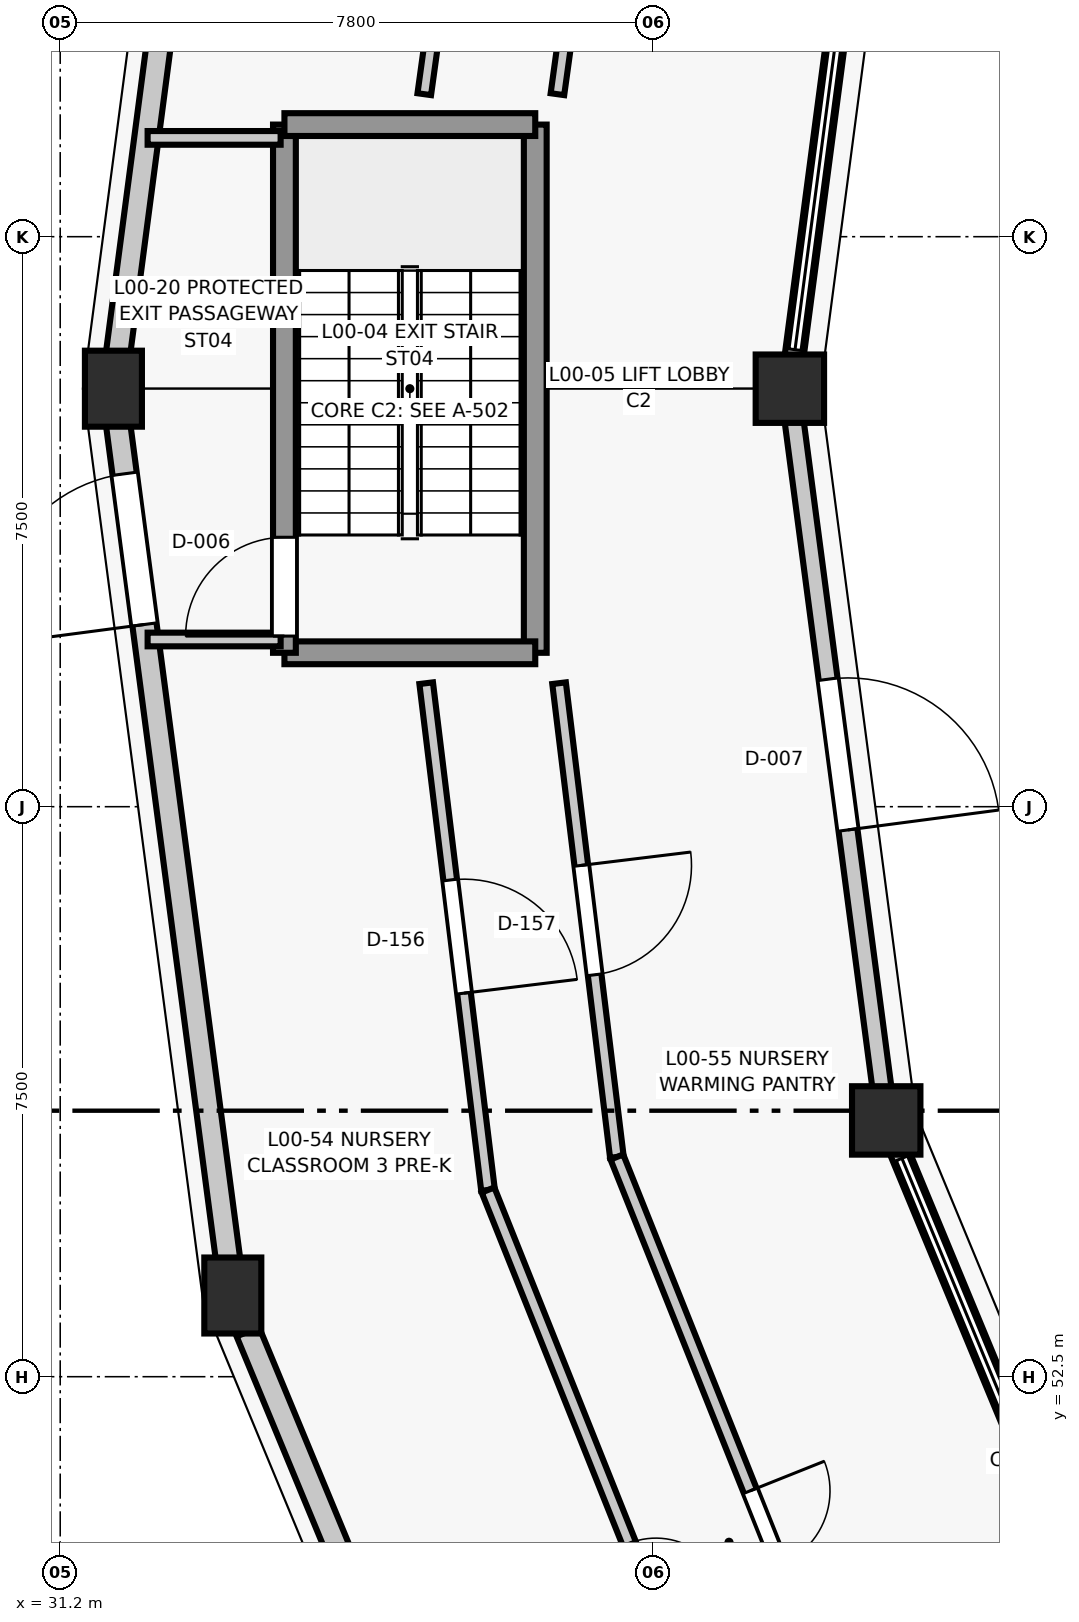
"""IFC4 building model, lengths in metres.
Left out: names, types, materials, properties, quantities, classifications, styles, units other than length and angle.
Written with IfcOpenShell. Run it as: python <this file> out.ifc"""

import sys

from ifc_helpers import new_model, si_unit, direction, frame, frame_2d, origin, origin_2d, place, context, subcontext, project, spatial, rectangle, circle, extrude, element, fill, save


model = new_model("IFC4")
c1 = context("Model", 3, precision=1e-05, world=origin(), true_north=direction((0.0, 1.0)))
c2 = subcontext(c1, "Body", "Model", "MODEL_VIEW")
j1 = project(units=[si_unit("LENGTHUNIT", "METRE"), si_unit("PLANEANGLEUNIT", "RADIAN")], contexts=[c1])
p1 = place(None, origin())
s1 = spatial("IfcSite", under=j1, at=p1, CompositionType="ELEMENT")
p2 = place(p1, origin())
s2 = spatial("IfcBuilding", under=s1, at=p2, CompositionType="ELEMENT")
p3 = place(p2, origin())
s3 = spatial("IfcBuildingStorey", under=s2, at=p3, CompositionType="ELEMENT", Elevation=0.0)
for number, where, z_axis, x_axis in (
    (1, (40.8, 65.5, 0.0), (0.0, 0.0, 1.0), (1.0, 0.0, 0.0)),
    (2, (42.068, 55.872, 0.0), (0.0, 0.0, 1.0), (1.0, 0.0, 0.0)),
):
    element("IfcColumn", number, at=place(p3, frame(where, z_axis=z_axis, x_axis=x_axis)), inside=s3, PredefinedType="COLUMN", context=c2, shape_type="SweptSolid", body=[
        extrude(circle(Radius=0.45, at=origin_2d()), origin(), (0.0, 0.0, 1.0), 4.5),
    ])
for number, where, z_axis, x_axis in (
    (3, (31.9, 65.5, 0.0), (0.0, 0.0, 1.0), (1.0, 0.0, 0.0)),
    (4, (33.471, 53.568, 0.0), (0.0, 0.0, 1.0), (1.0, 0.0, 0.0)),
):
    element("IfcColumn", number, at=place(p3, frame(where, z_axis=z_axis, x_axis=x_axis)), inside=s3, PredefinedType="COLUMN", context=c2, shape_type="SweptSolid", body=[
        extrude(rectangle(XDim=0.75, YDim=1.0, at=origin_2d()), origin(), (0.0, 0.0, 1.0), 4.5),
    ])
p4 = place(p3, frame((31.963, 65.975, 0.0), z_axis=(0.0, 0.0, 1.0), x_axis=(0.130513242145, 0.991446566197, 0.0)))
e5 = element("IfcWall", 5, at=p4, inside=s3, PredefinedType="STANDARD", context=c2, shape_type="SweptSolid", body=[
    extrude(rectangle(XDim=11.076, YDim=0.32, at=frame_2d((5.538, 0.0))), origin(), (0.0, 0.0, 1.0), 3.466),
])
p5 = place(p4, frame((4.913, 0.0, 0.0)))
e6 = element("IfcOpeningElement", 6, at=p5, cuts=e5, PredefinedType="OPENING", context=c2, shape_type="SweptSolid", body=[
    extrude(rectangle(XDim=1.25, YDim=2.2, at=frame_2d((0.625, 1.1))), frame((0.0, 0.17, 0.0), z_axis=(0.0, -1.0, 0.0), x_axis=(1.0, 0.0, 0.0)), (0.0, 0.0, 1.0), 0.34),
])
p6 = place(p3, frame((42.031, 74.853, 0.0), z_axis=(0.0, 0.0, 1.0), x_axis=(-0.130549698469, -0.991441766434, 0.0)))
e7 = element("IfcWall", 7, at=p6, inside=s3, PredefinedType="STANDARD", context=c2, shape_type="SweptSolid", body=[
    extrude(rectangle(XDim=9.156, YDim=0.25, at=frame_2d((4.578, 0.0))), origin(), (0.0, 0.0, 1.0), 0.82),
])
p7 = place(p3, frame((33.408, 54.044, 0.0), z_axis=(0.0, 0.0, 1.0), x_axis=(-0.130513242145, 0.991446566197, 0.0)))
e8 = element("IfcWall", 8, at=p7, inside=s3, PredefinedType="STANDARD", context=c2, shape_type="SweptSolid", body=[
    extrude(rectangle(XDim=11.076, YDim=0.32, at=frame_2d((5.538, 0.0))), origin(), (0.0, 0.0, 1.0), 3.466),
])
p8 = place(p7, frame((8.426, 0.0, 0.0)))
e9 = element("IfcOpeningElement", 9, at=p8, cuts=e8, PredefinedType="OPENING", context=c2, shape_type="SweptSolid", body=[
    extrude(rectangle(XDim=2.0, YDim=2.3, at=frame_2d((1.0, 1.15))), frame((0.0, 0.17, 0.0), z_axis=(0.0, -1.0, 0.0), x_axis=(1.0, 0.0, 0.0)), (0.0, 0.0, 1.0), 0.34),
])
p9 = place(p3, frame((40.836, 65.225, 0.0), z_axis=(0.0, 0.0, 1.0), x_axis=(0.130549698469, -0.991441766434, 0.0)))
e10 = element("IfcWall", 10, at=p9, inside=s3, PredefinedType="STANDARD", context=c2, shape_type="SweptSolid", body=[
    extrude(rectangle(XDim=9.156, YDim=0.25, at=frame_2d((4.578, 0.0))), origin(), (0.0, 0.0, 1.0), 3.549),
])
p10 = place(p9, frame((3.578, 0.0, 0.0)))
e11 = element("IfcOpeningElement", 11, at=p10, cuts=e10, PredefinedType="OPENING", context=c2, shape_type="SweptSolid", body=[
    extrude(rectangle(XDim=2.0, YDim=2.3, at=frame_2d((1.0, 1.15))), frame((0.0, 0.135, 0.0), z_axis=(0.0, -1.0, 0.0), x_axis=(1.0, 0.0, 0.0)), (0.0, 0.0, 1.0), 0.27),
])
p11 = place(p3, frame((37.879, 42.927, 0.0), z_axis=(0.0, 0.0, 1.0), x_axis=(-0.382695413149, 0.923874569817, 0.0)))
e12 = element("IfcWall", 12, at=p11, inside=s3, PredefinedType="STANDARD", context=c2, shape_type="SweptSolid", body=[
    extrude(rectangle(XDim=11.002, YDim=0.32, at=frame_2d((5.501, 0.0))), origin(), (0.0, 0.0, 1.0), 3.466),
])
p12 = place(p11, frame((4.401, 0.0, 0.0)))
e13 = element("IfcOpeningElement", 13, at=p12, cuts=e12, PredefinedType="OPENING", context=c2, shape_type="SweptSolid", body=[
    extrude(rectangle(XDim=2.2, YDim=2.35, at=frame_2d((1.1, 1.175))), frame((0.0, 0.17, 0.0), z_axis=(0.0, -1.0, 0.0), x_axis=(1.0, 0.0, 0.0)), (0.0, 0.0, 1.0), 0.34),
])
p13 = place(p3, frame((42.182, 55.595, 0.0), z_axis=(0.0, 0.0, 1.0), x_axis=(0.382681519675, -0.923880324771, 0.0)))
e14 = element("IfcWall", 14, at=p13, inside=s3, PredefinedType="STANDARD", context=c2, shape_type="SweptSolid", body=[
    extrude(rectangle(XDim=9.112, YDim=0.25, at=frame_2d((4.556, 0.0))), origin(), (0.0, 0.0, 1.0), 0.82),
])
p14 = place(p3, frame((37.45, 68.975, 0.0), z_axis=(0.0, 0.0, 1.0), x_axis=(0.0, -1.0, 0.0)))
e15 = element("IfcWall", 15, at=p14, inside=s3, PredefinedType="SHEAR", context=c2, shape_type="SweptSolid", body=[
    extrude(rectangle(XDim=6.95, YDim=0.3, at=frame_2d((3.475, 0.0))), origin(), (0.0, 0.0, 1.0), 4.5),
])
p15 = place(p3, frame((37.45, 62.025, 0.0), z_axis=(0.0, 0.0, 1.0), x_axis=(-1.0, 0.0, 0.0)))
e16 = element("IfcWall", 16, at=p15, inside=s3, PredefinedType="SHEAR", context=c2, shape_type="SweptSolid", body=[
    extrude(rectangle(XDim=3.3, YDim=0.3, at=frame_2d((1.65, 0.0))), origin(), (0.0, 0.0, 1.0), 4.5),
])
p16 = place(p3, frame((34.15, 62.025, 0.0), z_axis=(0.0, 0.0, 1.0), x_axis=(0.0, 1.0, 0.0)))
e17 = element("IfcWall", 17, at=p16, inside=s3, PredefinedType="SHEAR", context=c2, shape_type="SweptSolid", body=[
    extrude(rectangle(XDim=6.95, YDim=0.3, at=frame_2d((3.475, 0.0))), origin(), (0.0, 0.0, 1.0), 4.5),
])
p17 = place(p16, frame((0.22, 0.0, 0.0)))
e18 = element("IfcOpeningElement", 18, at=p17, cuts=e17, PredefinedType="OPENING", context=c2, shape_type="SweptSolid", body=[
    extrude(rectangle(XDim=1.3, YDim=2.15, at=frame_2d((0.65, 1.075))), frame((0.0, 0.16, 0.0), z_axis=(0.0, -1.0, 0.0), x_axis=(1.0, 0.0, 0.0)), (0.0, 0.0, 1.0), 0.32),
])
p18 = place(p3, frame((34.15, 68.975, 0.0), z_axis=(0.0, 0.0, 1.0), x_axis=(1.0, 0.0, 0.0)))
e19 = element("IfcWall", 19, at=p18, inside=s3, PredefinedType="SHEAR", context=c2, shape_type="SweptSolid", body=[
    extrude(rectangle(XDim=3.3, YDim=0.3, at=frame_2d((1.65, 0.0))), origin(), (0.0, 0.0, 1.0), 4.5),
])
for number, where, z_axis, x_axis in (
    (20, (32.35, 62.2, 0.0), (0.0, 0.0, 1.0), (1.0, 0.0, 0.0)),
    (21, (32.35, 68.8, 0.0), (0.0, 0.0, 1.0), (1.0, 0.0, 0.0)),
):
    element("IfcWall", number, at=place(p3, frame(where, z_axis=z_axis, x_axis=x_axis)), inside=s3, PredefinedType="PARTITIONING", context=c2, shape_type="SweptSolid", body=[
        extrude(rectangle(XDim=1.75, YDim=0.18, at=frame_2d((0.875, 0.0))), origin(), (0.0, 0.0, 1.0), 4.255),
    ])
p19 = place(p3, frame((37.001, 76.695, 0.0), z_axis=(0.0, 0.0, 1.0), x_axis=(-0.136812919882, -0.990596903363, 0.0)))
e22 = element("IfcWall", 22, at=p19, inside=s3, PredefinedType="PARTITIONING", context=c2, shape_type="SweptSolid", body=[
    extrude(rectangle(XDim=7.39, YDim=0.18, at=frame_2d((3.695, 0.0))), origin(), (0.0, 0.0, 1.0), 4.255),
])
p20 = place(p19, frame((3.17, 0.0, 0.0)))
e23 = element("IfcOpeningElement", 23, at=p20, cuts=e22, PredefinedType="OPENING", context=c2, shape_type="SweptSolid", body=[
    extrude(rectangle(XDim=1.05, YDim=2.1, at=frame_2d((0.525, 1.05))), frame((0.0, 0.1, 0.0), z_axis=(0.0, -1.0, 0.0), x_axis=(1.0, 0.0, 0.0)), (0.0, 0.0, 1.0), 0.2),
])
p21 = place(p3, frame((38.689, 76.234, 0.0), z_axis=(0.0, 0.0, 1.0), x_axis=(-0.136839031307, -0.990593296722, 0.0)))
e24 = element("IfcWall", 24, at=p21, inside=s3, PredefinedType="PARTITIONING", context=c2, shape_type="SweptSolid", body=[
    extrude(rectangle(XDim=6.924, YDim=0.18, at=frame_2d((3.462, 0.0))), origin(), (0.0, 0.0, 1.0), 4.255),
])
p22 = place(p21, frame((2.862, 0.0, 0.0)))
e25 = element("IfcOpeningElement", 25, at=p22, cuts=e24, PredefinedType="OPENING", context=c2, shape_type="SweptSolid", body=[
    extrude(rectangle(XDim=1.2, YDim=2.15, at=frame_2d((0.6, 1.075))), frame((0.0, 0.1, 0.0), z_axis=(0.0, -1.0, 0.0), x_axis=(1.0, 0.0, 0.0)), (0.0, 0.0, 1.0), 0.2),
])
p23 = place(p3, frame((36.015, 61.625, 0.0), z_axis=(0.0, 0.0, 1.0), x_axis=(0.121095426368, -0.992640870463, 0.0)))
e26 = element("IfcWall", 26, at=p23, inside=s3, PredefinedType="PARTITIONING", context=c2, shape_type="SweptSolid", body=[
    extrude(rectangle(XDim=6.718, YDim=0.18, at=frame_2d((3.359, 0.0))), origin(), (0.0, 0.0, 1.0), 4.255),
])
p24 = place(p23, frame((2.609, 0.0, 0.0)))
e27 = element("IfcOpeningElement", 27, at=p24, cuts=e26, PredefinedType="OPENING", context=c2, shape_type="SweptSolid", body=[
    extrude(rectangle(XDim=1.5, YDim=2.15, at=frame_2d((0.75, 1.075))), frame((0.0, 0.1, 0.0), z_axis=(0.0, -1.0, 0.0), x_axis=(1.0, 0.0, 0.0)), (0.0, 0.0, 1.0), 0.2),
])
p25 = place(p3, frame((37.763, 61.625, 0.0), z_axis=(0.0, 0.0, 1.0), x_axis=(0.12105344106, -0.992645991483, 0.0)))
e28 = element("IfcWall", 28, at=p25, inside=s3, PredefinedType="PARTITIONING", context=c2, shape_type="SweptSolid", body=[
    extrude(rectangle(XDim=6.28, YDim=0.18, at=frame_2d((3.14, 0.0))), origin(), (0.0, 0.0, 1.0), 4.255),
])
p26 = place(p25, frame((2.415, 0.0, 0.0)))
e29 = element("IfcOpeningElement", 29, at=p26, cuts=e28, PredefinedType="OPENING", context=c2, shape_type="SweptSolid", body=[
    extrude(rectangle(XDim=1.45, YDim=2.2, at=frame_2d((0.725, 1.1))), frame((0.0, 0.1, 0.0), z_axis=(0.0, -1.0, 0.0), x_axis=(1.0, 0.0, 0.0)), (0.0, 0.0, 1.0), 0.2),
])
p27 = place(p3, frame((36.829, 54.957, 0.0), z_axis=(0.0, 0.0, 1.0), x_axis=(0.370918279433, -0.928665510279, 0.0)))
e30 = element("IfcWall", 30, at=p27, inside=s3, PredefinedType="PARTITIONING", context=c2, shape_type="SweptSolid", body=[
    extrude(rectangle(XDim=10.961, YDim=0.18, at=frame_2d((5.48, 0.0))), origin(), (0.0, 0.0, 1.0), 4.255),
])
p28 = place(p27, frame((5.006, 0.0, 0.0)))
e31 = element("IfcOpeningElement", 31, at=p28, cuts=e30, PredefinedType="OPENING", context=c2, shape_type="SweptSolid", body=[
    extrude(rectangle(XDim=0.95, YDim=2.1, at=frame_2d((0.475, 1.05))), frame((0.0, 0.1, 0.0), z_axis=(0.0, -1.0, 0.0), x_axis=(1.0, 0.0, 0.0)), (0.0, 0.0, 1.0), 0.2),
])
p29 = place(p3, frame((38.524, 55.391, 0.0), z_axis=(0.0, 0.0, 1.0), x_axis=(0.370942047159, -0.92865601686, 0.0)))
e32 = element("IfcWall", 32, at=p29, inside=s3, PredefinedType="PARTITIONING", context=c2, shape_type="SweptSolid", body=[
    extrude(rectangle(XDim=10.51, YDim=0.18, at=frame_2d((5.255, 0.0))), origin(), (0.0, 0.0, 1.0), 4.255),
])
p30 = place(p29, frame((4.73, 0.0, 0.0)))
e33 = element("IfcOpeningElement", 33, at=p30, cuts=e32, PredefinedType="OPENING", context=c2, shape_type="SweptSolid", body=[
    extrude(rectangle(XDim=1.05, YDim=2.1, at=frame_2d((0.525, 1.05))), frame((0.0, 0.1, 0.0), z_axis=(0.0, -1.0, 0.0), x_axis=(1.0, 0.0, 0.0)), (0.0, 0.0, 1.0), 0.2),
])
p31 = place(p8, origin())
e34 = element("IfcDoor", 34, at=p31, inside=s3, OperationType="SINGLE_SWING_LEFT", PredefinedType="DOOR", context=c2, shape_type="SweptSolid", body=[
    extrude(rectangle(XDim=2.0, YDim=2.3, at=frame_2d((1.0, 1.15))), frame((0.0, 0.025, 0.0), z_axis=(0.0, -1.0, 0.0), x_axis=(1.0, 0.0, 0.0)), (0.0, 0.0, 1.0), 0.05),
])
fill(e9, e34)
p32 = place(p10, origin())
e35 = element("IfcDoor", 35, at=p32, inside=s3, OperationType="SINGLE_SWING_RIGHT", PredefinedType="DOOR", context=c2, shape_type="SweptSolid", body=[
    extrude(rectangle(XDim=2.0, YDim=2.3, at=frame_2d((1.0, 1.15))), frame((0.0, 0.025, 0.0), z_axis=(0.0, -1.0, 0.0), x_axis=(1.0, 0.0, 0.0)), (0.0, 0.0, 1.0), 0.05),
])
fill(e11, e35)
p33 = place(p17, origin())
e36 = element("IfcDoor", 36, at=p33, inside=s3, OperationType="SINGLE_SWING_LEFT", PredefinedType="DOOR", context=c2, shape_type="SweptSolid", body=[
    extrude(rectangle(XDim=1.3, YDim=2.15, at=frame_2d((0.65, 1.075))), frame((0.0, 0.025, 0.0), z_axis=(0.0, -1.0, 0.0), x_axis=(1.0, 0.0, 0.0)), (0.0, 0.0, 1.0), 0.05),
])
fill(e18, e36)
p34 = place(p24, origin())
e37 = element("IfcDoor", 37, at=p34, inside=s3, OperationType="SINGLE_SWING_RIGHT", PredefinedType="DOOR", context=c2, shape_type="SweptSolid", body=[
    extrude(rectangle(XDim=1.5, YDim=2.15, at=frame_2d((0.75, 1.075))), frame((0.0, 0.025, 0.0), z_axis=(0.0, -1.0, 0.0), x_axis=(1.0, 0.0, 0.0)), (0.0, 0.0, 1.0), 0.05),
])
fill(e27, e37)
p35 = place(p26, origin())
e38 = element("IfcDoor", 38, at=p35, inside=s3, OperationType="SINGLE_SWING_LEFT", PredefinedType="DOOR", context=c2, shape_type="SweptSolid", body=[
    extrude(rectangle(XDim=1.45, YDim=2.2, at=frame_2d((0.725, 1.1))), frame((0.0, 0.025, 0.0), z_axis=(0.0, -1.0, 0.0), x_axis=(1.0, 0.0, 0.0)), (0.0, 0.0, 1.0), 0.05),
])
fill(e29, e38)
p36 = place(p30, origin())
e39 = element("IfcDoor", 39, at=p36, inside=s3, OperationType="SINGLE_SWING_LEFT", PredefinedType="DOOR", context=c2, shape_type="SweptSolid", body=[
    extrude(rectangle(XDim=1.05, YDim=2.1, at=frame_2d((0.525, 1.05))), frame((0.0, 0.025, 0.0), z_axis=(0.0, -1.0, 0.0), x_axis=(1.0, 0.0, 0.0)), (0.0, 0.0, 1.0), 0.05),
])
fill(e33, e39)
save(model, sys.argv[1])
